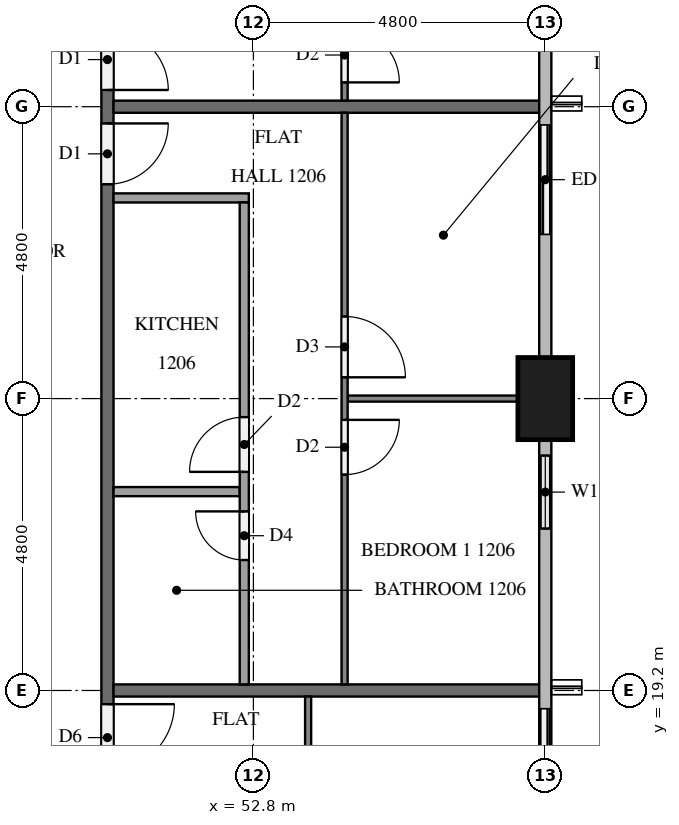
"""IFC4 building model, lengths in metres.
Left out: names, types, materials, properties, quantities, classifications, styles, units other than length and angle.
Written with IfcOpenShell. Run it as: python <this file> out.ifc"""

import sys

from ifc_helpers import new_model, si_unit, direction, frame, frame_2d, origin, origin_2d, place, context, subcontext, project, spatial, rectangle, extrude, element, fill, save


model = new_model("IFC4")
c1 = context("Model", 3, precision=1e-05, world=origin(), true_north=direction((0.0, 1.0)))
c2 = subcontext(c1, "Body", "Model", "MODEL_VIEW")
j1 = project(units=[si_unit("LENGTHUNIT", "METRE"), si_unit("PLANEANGLEUNIT", "RADIAN")], contexts=[c1])
p1 = place(None, origin())
s1 = spatial("IfcSite", under=j1, at=p1, CompositionType="ELEMENT")
p2 = place(p1, origin())
s2 = spatial("IfcBuilding", under=s1, at=p2, CompositionType="ELEMENT")
p3 = place(p2, frame((0.0, 0.0, 50.4)))
s3 = spatial("IfcBuildingStorey", under=s2, at=p3, CompositionType="ELEMENT", Elevation=50.4)
p4 = place(p3, frame((57.6, 24.0, 0.0), z_axis=(0.0, 0.0, 1.0), x_axis=(0.0, 1.0, 0.0)))
e1 = element("IfcColumn", 1, at=p4, inside=s3, PredefinedType="COLUMN", context=c2, shape_type="SweptSolid", body=[
    extrude(rectangle(XDim=1.35, YDim=0.9, at=origin_2d()), origin(), (0.0, 0.0, 1.0), 3.1),
])
p5 = place(p3, frame((57.6, 16.8, 0.0), z_axis=(0.0, 0.0, 1.0), x_axis=(0.0, 1.0, 0.0)))
e2 = element("IfcWall", 2, at=p5, inside=s3, PredefinedType="SOLIDWALL", context=c2, shape_type="SweptSolid", body=[
    extrude(rectangle(XDim=2.4, YDim=0.15, at=frame_2d((1.2, 0.0))), origin(), (0.0, 0.0, 1.0), 3.1),
])
p6 = place(p5, frame((0.3, 0.0, 0.0)))
e3 = element("IfcOpeningElement", 3, at=p6, cuts=e2, PredefinedType="OPENING", context=c2, shape_type="SweptSolid", body=[
    extrude(rectangle(XDim=1.8, YDim=2.4, at=frame_2d((0.9, 1.2))), frame((0.0, 0.085, 0.0), z_axis=(0.0, -1.0, 0.0), x_axis=(1.0, 0.0, 0.0)), (0.0, 0.0, 1.0), 0.17),
])
p7 = place(p3, frame((57.6, 21.6, 0.0), z_axis=(0.0, 0.0, 1.0), x_axis=(0.0, 1.0, 0.0)))
e4 = element("IfcWall", 4, at=p7, inside=s3, PredefinedType="SOLIDWALL", context=c2, shape_type="SweptSolid", body=[
    extrude(rectangle(XDim=1.725, YDim=0.15, at=frame_2d((0.862, 0.0))), origin(), (0.0, 0.0, 1.0), 3.1),
])
p8 = place(p7, frame((0.262, 0.0, 0.9)))
e5 = element("IfcOpeningElement", 5, at=p8, cuts=e4, PredefinedType="OPENING", context=c2, shape_type="SweptSolid", body=[
    extrude(rectangle(XDim=1.2, YDim=1.4, at=frame_2d((0.6, 0.7))), frame((0.0, 0.085, 0.0), z_axis=(0.0, -1.0, 0.0), x_axis=(1.0, 0.0, 0.0)), (0.0, 0.0, 1.0), 0.17),
])
p9 = place(p3, frame((57.6, 26.4, 0.0), z_axis=(0.0, 0.0, 1.0), x_axis=(0.0, 1.0, 0.0)))
e6 = element("IfcWall", 6, at=p9, inside=s3, PredefinedType="SOLIDWALL", context=c2, shape_type="SweptSolid", body=[
    extrude(rectangle(XDim=2.4, YDim=0.15, at=frame_2d((1.2, 0.0))), origin(), (0.0, 0.0, 1.0), 3.1),
])
p10 = place(p9, frame((0.3, 0.0, 0.0)))
e7 = element("IfcOpeningElement", 7, at=p10, cuts=e6, PredefinedType="OPENING", context=c2, shape_type="SweptSolid", body=[
    extrude(rectangle(XDim=1.8, YDim=2.4, at=frame_2d((0.9, 1.2))), frame((0.0, 0.085, 0.0), z_axis=(0.0, -1.0, 0.0), x_axis=(1.0, 0.0, 0.0)), (0.0, 0.0, 1.0), 0.17),
])
p11 = place(p3, frame((50.4, 40.7, 0.0), z_axis=(0.0, 0.0, 1.0), x_axis=(0.0, -1.0, 0.0)))
e8 = element("IfcWall", 8, at=p11, inside=s3, PredefinedType="PARTITIONING", context=c2, shape_type="SweptSolid", body=[
    extrude(rectangle(XDim=28.6, YDim=0.2, at=frame_2d((14.3, 0.0))), origin(), (0.0, 0.0, 1.0), 3.1),
])
p12 = place(p11, frame((21.725, 0.0, 0.0)))
e9 = element("IfcOpeningElement", 9, at=p12, cuts=e8, PredefinedType="OPENING", context=c2, shape_type="SweptSolid", body=[
    extrude(rectangle(XDim=1.1, YDim=2.1, at=frame_2d((0.55, 1.05))), frame((0.0, 0.11, 0.0), z_axis=(0.0, -1.0, 0.0), x_axis=(1.0, 0.0, 0.0)), (0.0, 0.0, 1.0), 0.22),
])
p13 = place(p11, frame((12.175, 0.0, 0.0)))
e10 = element("IfcOpeningElement", 10, at=p13, cuts=e8, PredefinedType="OPENING", context=c2, shape_type="SweptSolid", body=[
    extrude(rectangle(XDim=1.0, YDim=2.1, at=frame_2d((0.5, 1.05))), frame((0.0, 0.11, 0.0), z_axis=(0.0, -1.0, 0.0), x_axis=(1.0, 0.0, 0.0)), (0.0, 0.0, 1.0), 0.22),
])
p14 = place(p11, frame((10.625, 0.0, 0.0)))
e11 = element("IfcOpeningElement", 11, at=p14, cuts=e8, PredefinedType="OPENING", context=c2, shape_type="SweptSolid", body=[
    extrude(rectangle(XDim=1.0, YDim=2.1, at=frame_2d((0.5, 1.05))), frame((0.0, 0.11, 0.0), z_axis=(0.0, -1.0, 0.0), x_axis=(1.0, 0.0, 0.0)), (0.0, 0.0, 1.0), 0.22),
])
for number, where, z_axis, x_axis in (
    (12, (50.5, 19.2, 0.0), (0.0, 0.0, 1.0), (1.0, 0.0, 0.0)),
    (13, (50.5, 28.8, 0.0), (0.0, 0.0, 1.0), (1.0, 0.0, 0.0)),
):
    element("IfcWall", number, at=place(p3, frame(where, z_axis=z_axis, x_axis=x_axis)), inside=s3, PredefinedType="PARTITIONING", context=c2, shape_type="SweptSolid", body=[
        extrude(rectangle(XDim=7.0, YDim=0.2, at=frame_2d((3.5, 0.0))), origin(), (0.0, 0.0, 1.0), 3.1),
    ])
p15 = place(p3, frame((53.7, 19.1, 0.0), z_axis=(0.0, 0.0, 1.0), x_axis=(0.0, -1.0, 0.0)))
e14 = element("IfcWall", 14, at=p15, inside=s3, PredefinedType="PARTITIONING", context=c2, shape_type="SweptSolid", body=[
    extrude(rectangle(XDim=18.759, YDim=0.1, at=frame_2d((9.379, 0.0))), origin(), (0.0, 0.0, 1.0), 3.1),
])
p16 = place(p15, frame((3.35, 0.0, 0.0)))
e15 = element("IfcOpeningElement", 15, at=p16, cuts=e14, PredefinedType="OPENING", context=c2, shape_type="SweptSolid", body=[
    extrude(rectangle(XDim=1.0, YDim=2.1, at=frame_2d((0.5, 1.05))), frame((0.0, 0.06, 0.0), z_axis=(0.0, -1.0, 0.0), x_axis=(1.0, 0.0, 0.0)), (0.0, 0.0, 1.0), 0.12),
])
p17 = place(p15, frame((5.05, 0.0, 0.0)))
e16 = element("IfcOpeningElement", 16, at=p17, cuts=e14, PredefinedType="OPENING", context=c2, shape_type="SweptSolid", body=[
    extrude(rectangle(XDim=0.9, YDim=2.1, at=frame_2d((0.45, 1.05))), frame((0.0, 0.06, 0.0), z_axis=(0.0, -1.0, 0.0), x_axis=(1.0, 0.0, 0.0)), (0.0, 0.0, 1.0), 0.12),
])
p18 = place(p15, frame((13.05, 0.0, 0.0)))
e17 = element("IfcOpeningElement", 17, at=p18, cuts=e14, PredefinedType="OPENING", context=c2, shape_type="SweptSolid", body=[
    extrude(rectangle(XDim=0.9, YDim=2.1, at=frame_2d((0.45, 1.05))), frame((0.0, 0.06, 0.0), z_axis=(0.0, -1.0, 0.0), x_axis=(1.0, 0.0, 0.0)), (0.0, 0.0, 1.0), 0.12),
])
p19 = place(p15, frame((14.65, 0.0, 0.0)))
e18 = element("IfcOpeningElement", 18, at=p19, cuts=e14, PredefinedType="OPENING", context=c2, shape_type="SweptSolid", body=[
    extrude(rectangle(XDim=0.9, YDim=2.1, at=frame_2d((0.45, 1.05))), frame((0.0, 0.06, 0.0), z_axis=(0.0, -1.0, 0.0), x_axis=(1.0, 0.0, 0.0)), (0.0, 0.0, 1.0), 0.12),
])
p20 = place(p3, frame((54.35, 24.0, 0.0), z_axis=(0.0, 0.0, 1.0), x_axis=(1.0, 0.0, 0.0)))
e19 = element("IfcWall", 19, at=p20, inside=s3, PredefinedType="PARTITIONING", context=c2, shape_type="SweptSolid", body=[
    extrude(rectangle(XDim=2.8, YDim=0.1, at=frame_2d((1.4, 0.0))), origin(), (0.0, 0.0, 1.0), 3.1),
])
p21 = place(p3, frame((54.3, 28.7, 0.0), z_axis=(0.0, 0.0, 1.0), x_axis=(0.0, -1.0, 0.0)))
e20 = element("IfcWall", 20, at=p21, inside=s3, PredefinedType="PARTITIONING", context=c2, shape_type="SweptSolid", body=[
    extrude(rectangle(XDim=9.4, YDim=0.1, at=frame_2d((4.7, 0.0))), origin(), (0.0, 0.0, 1.0), 3.1),
])
p22 = place(p21, frame((3.35, 0.0, 0.0)))
e21 = element("IfcOpeningElement", 21, at=p22, cuts=e20, PredefinedType="OPENING", context=c2, shape_type="SweptSolid", body=[
    extrude(rectangle(XDim=1.0, YDim=2.1, at=frame_2d((0.5, 1.05))), frame((0.0, 0.06, 0.0), z_axis=(0.0, -1.0, 0.0), x_axis=(1.0, 0.0, 0.0)), (0.0, 0.0, 1.0), 0.12),
])
p23 = place(p21, frame((5.05, 0.0, 0.0)))
e22 = element("IfcOpeningElement", 22, at=p23, cuts=e20, PredefinedType="OPENING", context=c2, shape_type="SweptSolid", body=[
    extrude(rectangle(XDim=0.9, YDim=2.1, at=frame_2d((0.45, 1.05))), frame((0.0, 0.06, 0.0), z_axis=(0.0, -1.0, 0.0), x_axis=(1.0, 0.0, 0.0)), (0.0, 0.0, 1.0), 0.12),
])
p24 = place(p3, frame((50.5, 22.47, 0.0), z_axis=(0.0, 0.0, 1.0), x_axis=(1.0, 0.0, 0.0)))
e23 = element("IfcWall", 23, at=p24, inside=s3, PredefinedType="PARTITIONING", context=c2, shape_type="SweptSolid", body=[
    extrude(rectangle(XDim=2.075, YDim=0.15, at=frame_2d((1.038, 0.0))), origin(), (0.0, 0.0, 1.0), 3.1),
])
p25 = place(p3, frame((50.5, 27.3, 0.0), z_axis=(0.0, 0.0, 1.0), x_axis=(1.0, 0.0, 0.0)))
e24 = element("IfcWall", 24, at=p25, inside=s3, PredefinedType="PARTITIONING", context=c2, shape_type="SweptSolid", body=[
    extrude(rectangle(XDim=2.225, YDim=0.15, at=frame_2d((1.113, 0.0))), origin(), (0.0, 0.0, 1.0), 3.1),
])
p26 = place(p3, frame((52.65, 19.3, 0.0), z_axis=(0.0, 0.0, 1.0), x_axis=(0.0, 1.0, 0.0)))
e25 = element("IfcWall", 25, at=p26, inside=s3, PredefinedType="PARTITIONING", context=c2, shape_type="SweptSolid", body=[
    extrude(rectangle(XDim=7.925, YDim=0.15, at=frame_2d((3.962, 0.0))), origin(), (0.0, 0.0, 1.0), 3.1),
])
p27 = place(p26, frame((3.495, 0.0, 0.0)))
e26 = element("IfcOpeningElement", 26, at=p27, cuts=e25, PredefinedType="OPENING", context=c2, shape_type="SweptSolid", body=[
    extrude(rectangle(XDim=0.9, YDim=2.1, at=frame_2d((0.45, 1.05))), frame((0.0, 0.085, 0.0), z_axis=(0.0, -1.0, 0.0), x_axis=(1.0, 0.0, 0.0)), (0.0, 0.0, 1.0), 0.17),
])
p28 = place(p26, frame((2.045, 0.0, 0.0)))
e27 = element("IfcOpeningElement", 27, at=p28, cuts=e25, PredefinedType="OPENING", context=c2, shape_type="SweptSolid", body=[
    extrude(rectangle(XDim=0.8, YDim=2.1, at=frame_2d((0.4, 1.05))), frame((0.0, 0.085, 0.0), z_axis=(0.0, -1.0, 0.0), x_axis=(1.0, 0.0, 0.0)), (0.0, 0.0, 1.0), 0.17),
])
p29 = place(p3, frame((54.3, 40.7, 0.0), z_axis=(0.0, 0.0, 1.0), x_axis=(0.0, -1.0, 0.0)))
e28 = element("IfcWall", 28, at=p29, inside=s3, PredefinedType="PARTITIONING", context=c2, shape_type="SweptSolid", body=[
    extrude(rectangle(XDim=11.8, YDim=0.1, at=frame_2d((5.9, 0.0))), origin(), (0.0, 0.0, 1.0), 3.1),
])
p30 = place(p29, frame((10.6, 0.0, 0.0)))
e29 = element("IfcOpeningElement", 29, at=p30, cuts=e28, PredefinedType="OPENING", context=c2, shape_type="SweptSolid", body=[
    extrude(rectangle(XDim=0.9, YDim=2.1, at=frame_2d((0.45, 1.05))), frame((0.0, 0.06, 0.0), z_axis=(0.0, -1.0, 0.0), x_axis=(1.0, 0.0, 0.0)), (0.0, 0.0, 1.0), 0.12),
])
p31 = place(p29, frame((0.3, 0.0, 0.0)))
e30 = element("IfcOpeningElement", 30, at=p31, cuts=e28, PredefinedType="OPENING", context=c2, shape_type="SweptSolid", body=[
    extrude(rectangle(XDim=1.0, YDim=2.1, at=frame_2d((0.5, 1.05))), frame((0.0, 0.06, 0.0), z_axis=(0.0, -1.0, 0.0), x_axis=(1.0, 0.0, 0.0)), (0.0, 0.0, 1.0), 0.12),
])
p32 = place(p6, origin())
e31 = element("IfcDoor", 31, at=p32, inside=s3, OperationType="SLIDING_TO_RIGHT", PredefinedType="DOOR", context=c2, shape_type="SweptSolid", body=[
    extrude(rectangle(XDim=1.8, YDim=2.4, at=frame_2d((0.9, 1.2))), frame((0.0, 0.025, 0.0), z_axis=(0.0, -1.0, 0.0), x_axis=(1.0, 0.0, 0.0)), (0.0, 0.0, 1.0), 0.05),
])
fill(e3, e31)
p33 = place(p8, origin())
e32 = element("IfcWindow", 32, at=p33, inside=s3, PartitioningType="SINGLE_PANEL", PredefinedType="WINDOW", context=c2, shape_type="SweptSolid", body=[
    extrude(rectangle(XDim=1.2, YDim=1.4, at=frame_2d((0.6, 0.7))), frame((0.0, 0.03, 0.0), z_axis=(0.0, -1.0, 0.0), x_axis=(1.0, 0.0, 0.0)), (0.0, 0.0, 1.0), 0.06),
])
fill(e5, e32)
p34 = place(p10, origin())
e33 = element("IfcDoor", 33, at=p34, inside=s3, OperationType="SLIDING_TO_LEFT", PredefinedType="DOOR", context=c2, shape_type="SweptSolid", body=[
    extrude(rectangle(XDim=1.8, YDim=2.4, at=frame_2d((0.9, 1.2))), frame((0.0, 0.025, 0.0), z_axis=(0.0, -1.0, 0.0), x_axis=(1.0, 0.0, 0.0)), (0.0, 0.0, 1.0), 0.05),
])
fill(e7, e33)
p35 = place(p12, origin())
e34 = element("IfcDoor", 34, at=p35, inside=s3, OperationType="SINGLE_SWING_LEFT", PredefinedType="DOOR", context=c2, shape_type="SweptSolid", body=[
    extrude(rectangle(XDim=1.1, YDim=2.1, at=frame_2d((0.55, 1.05))), frame((0.0, 0.025, 0.0), z_axis=(0.0, -1.0, 0.0), x_axis=(1.0, 0.0, 0.0)), (0.0, 0.0, 1.0), 0.05),
])
fill(e9, e34)
p36 = place(p13, origin())
e35 = element("IfcDoor", 35, at=p36, inside=s3, OperationType="SINGLE_SWING_LEFT", PredefinedType="DOOR", context=c2, shape_type="SweptSolid", body=[
    extrude(rectangle(XDim=1.0, YDim=2.1, at=frame_2d((0.5, 1.05))), frame((0.0, 0.025, 0.0), z_axis=(0.0, -1.0, 0.0), x_axis=(1.0, 0.0, 0.0)), (0.0, 0.0, 1.0), 0.05),
])
fill(e10, e35)
p37 = place(p14, origin())
e36 = element("IfcDoor", 36, at=p37, inside=s3, OperationType="SINGLE_SWING_RIGHT", PredefinedType="DOOR", context=c2, shape_type="SweptSolid", body=[
    extrude(rectangle(XDim=1.0, YDim=2.1, at=frame_2d((0.5, 1.05))), frame((0.0, 0.025, 0.0), z_axis=(0.0, -1.0, 0.0), x_axis=(1.0, 0.0, 0.0)), (0.0, 0.0, 1.0), 0.05),
])
fill(e11, e36)
p38 = place(p22, origin())
e37 = element("IfcDoor", 37, at=p38, inside=s3, OperationType="SINGLE_SWING_RIGHT", PredefinedType="DOOR", context=c2, shape_type="SweptSolid", body=[
    extrude(rectangle(XDim=1.0, YDim=2.1, at=frame_2d((0.5, 1.05))), frame((0.0, 0.025, 0.0), z_axis=(0.0, -1.0, 0.0), x_axis=(1.0, 0.0, 0.0)), (0.0, 0.0, 1.0), 0.05),
])
fill(e21, e37)
p39 = place(p23, origin())
e38 = element("IfcDoor", 38, at=p39, inside=s3, OperationType="SINGLE_SWING_LEFT", PredefinedType="DOOR", context=c2, shape_type="SweptSolid", body=[
    extrude(rectangle(XDim=0.9, YDim=2.1, at=frame_2d((0.45, 1.05))), frame((0.0, 0.025, 0.0), z_axis=(0.0, -1.0, 0.0), x_axis=(1.0, 0.0, 0.0)), (0.0, 0.0, 1.0), 0.05),
])
fill(e22, e38)
p40 = place(p27, origin())
e39 = element("IfcDoor", 39, at=p40, inside=s3, OperationType="SINGLE_SWING_LEFT", PredefinedType="DOOR", context=c2, shape_type="SweptSolid", body=[
    extrude(rectangle(XDim=0.9, YDim=2.1, at=frame_2d((0.45, 1.05))), frame((0.0, 0.025, 0.0), z_axis=(0.0, -1.0, 0.0), x_axis=(1.0, 0.0, 0.0)), (0.0, 0.0, 1.0), 0.05),
])
fill(e26, e39)
p41 = place(p28, origin())
e40 = element("IfcDoor", 40, at=p41, inside=s3, OperationType="SINGLE_SWING_RIGHT", PredefinedType="DOOR", context=c2, shape_type="SweptSolid", body=[
    extrude(rectangle(XDim=0.8, YDim=2.1, at=frame_2d((0.4, 1.05))), frame((0.0, 0.025, 0.0), z_axis=(0.0, -1.0, 0.0), x_axis=(1.0, 0.0, 0.0)), (0.0, 0.0, 1.0), 0.05),
])
fill(e27, e40)
p42 = place(p30, origin())
e41 = element("IfcDoor", 41, at=p42, inside=s3, OperationType="SINGLE_SWING_RIGHT", PredefinedType="DOOR", context=c2, shape_type="SweptSolid", body=[
    extrude(rectangle(XDim=0.9, YDim=2.1, at=frame_2d((0.45, 1.05))), frame((0.0, 0.025, 0.0), z_axis=(0.0, -1.0, 0.0), x_axis=(1.0, 0.0, 0.0)), (0.0, 0.0, 1.0), 0.05),
])
fill(e29, e41)
save(model, sys.argv[1])
